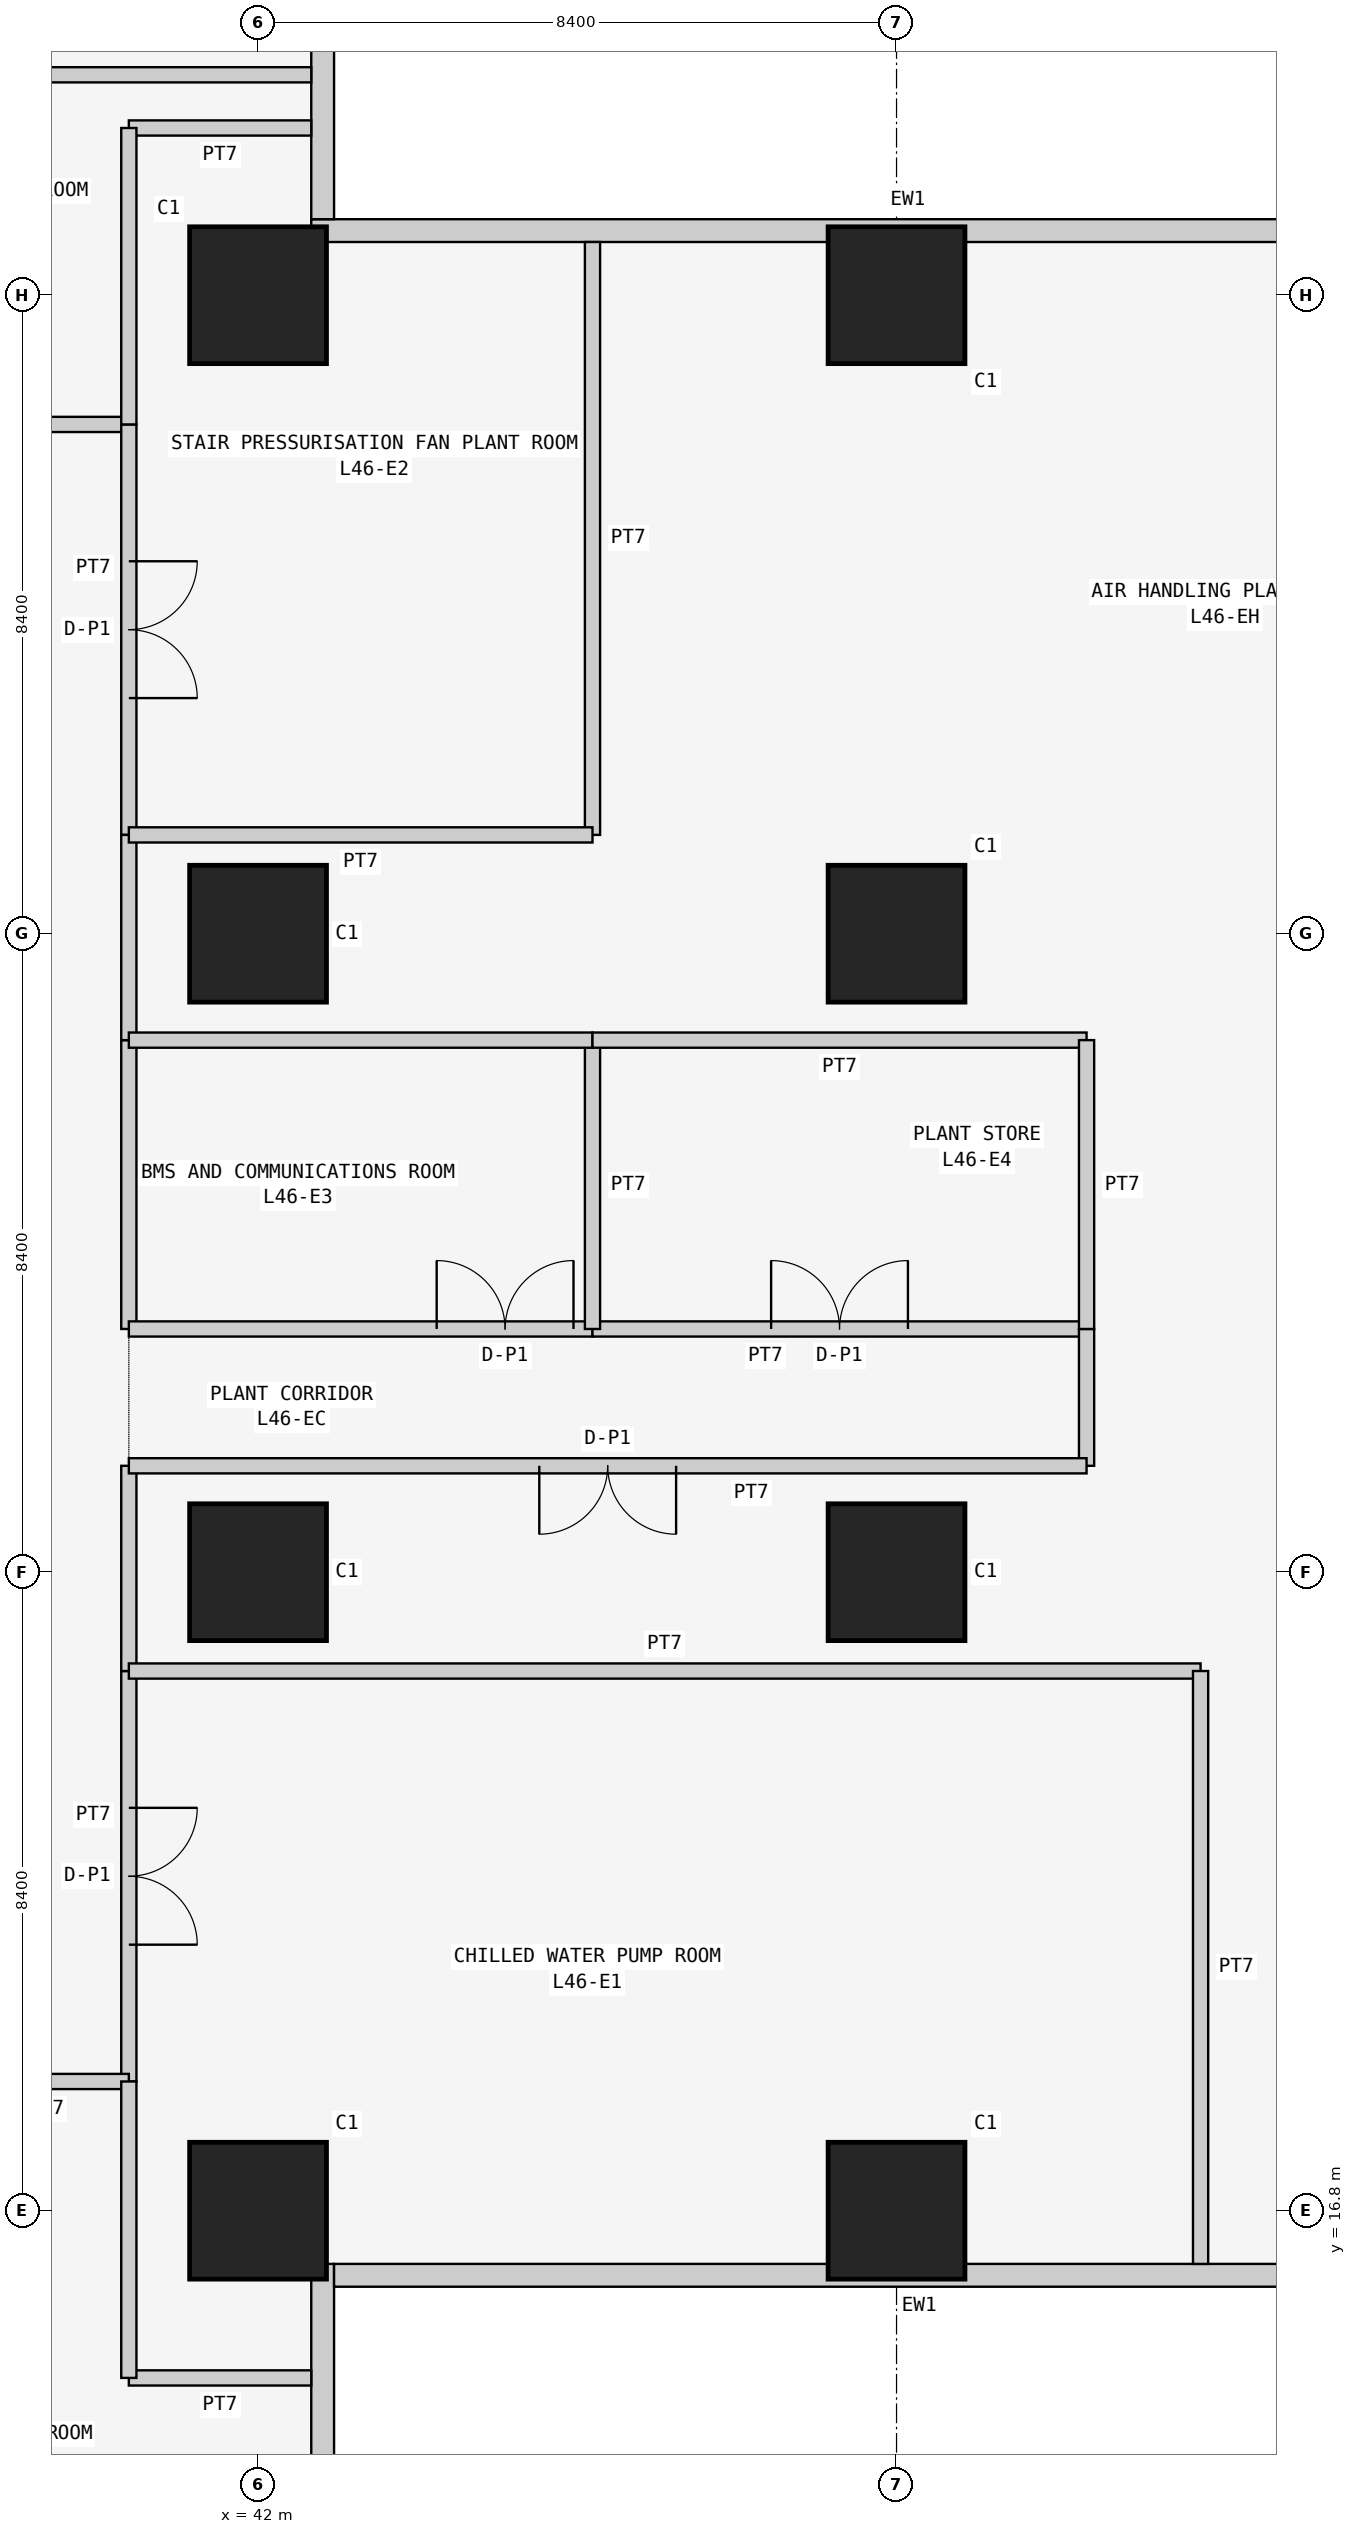
"""IFC4 building model, lengths in metres.
Left out: names, types, materials, properties, quantities, classifications, styles, units other than length and angle.
Written with IfcOpenShell. Run it as: python <this file> out.ifc"""

import sys

from ifc_helpers import new_model, si_unit, direction, frame, frame_2d, origin, origin_2d, place, context, subcontext, project, spatial, rectangle, extrude, element, fill, save


model = new_model("IFC4")
c1 = context("Model", 3, precision=1e-05, world=origin(), true_north=direction((0.0, 1.0)))
c2 = subcontext(c1, "Body", "Model", "MODEL_VIEW")
j1 = project(units=[si_unit("LENGTHUNIT", "METRE"), si_unit("PLANEANGLEUNIT", "RADIAN")], contexts=[c1])
p1 = place(None, origin())
s1 = spatial("IfcSite", under=j1, at=p1, CompositionType="ELEMENT")
p2 = place(p1, origin())
s2 = spatial("IfcBuilding", under=s1, at=p2, CompositionType="ELEMENT")
p3 = place(p2, frame((0.0, 0.0, 177.3)))
s3 = spatial("IfcBuildingStorey", under=s2, at=p3, CompositionType="ELEMENT", Elevation=177.3)
for number, where, z_axis, x_axis in (
    (1, (42.0, 16.8, 0.0), (0.0, 0.0, 1.0), (1.0, 0.0, 0.0)),
    (2, (42.0, 25.2, 0.0), (0.0, 0.0, 1.0), (1.0, 0.0, 0.0)),
    (3, (42.0, 33.6, 0.0), (0.0, 0.0, 1.0), (1.0, 0.0, 0.0)),
    (4, (42.0, 42.0, 0.0), (0.0, 0.0, 1.0), (1.0, 0.0, 0.0)),
    (5, (50.4, 16.8, 0.0), (0.0, 0.0, 1.0), (1.0, 0.0, 0.0)),
    (6, (50.4, 25.2, 0.0), (0.0, 0.0, 1.0), (1.0, 0.0, 0.0)),
    (7, (50.4, 33.6, 0.0), (0.0, 0.0, 1.0), (1.0, 0.0, 0.0)),
    (8, (50.4, 42.0, 0.0), (0.0, 0.0, 1.0), (1.0, 0.0, 0.0)),
):
    element("IfcColumn", number, at=place(p3, frame(where, z_axis=z_axis, x_axis=x_axis)), inside=s3, PredefinedType="COLUMN", context=c2, shape_type="SweptSolid", body=[
        extrude(rectangle(XDim=1.8, YDim=1.8, at=origin_2d()), origin(), (0.0, 0.0, 1.0), 6.0),
    ])
p4 = place(p3, frame((42.85, 8.8, 0.0), z_axis=(0.0, 0.0, 1.0), x_axis=(0.0, 1.0, 0.0)))
e9 = element("IfcWall", 9, at=p4, inside=s3, PredefinedType="SOLIDWALL", context=c2, shape_type="SweptSolid", body=[
    extrude(rectangle(XDim=7.3, YDim=0.3, at=frame_2d((3.65, 0.0))), origin(), (0.0, 0.0, 1.0), 5.85),
])
p5 = place(p3, frame((43.0, 15.95, 0.0), z_axis=(0.0, 0.0, 1.0), x_axis=(1.0, 0.0, 0.0)))
e10 = element("IfcWall", 10, at=p5, inside=s3, PredefinedType="SOLIDWALL", context=c2, shape_type="SweptSolid", body=[
    extrude(rectangle(XDim=15.4, YDim=0.3, at=frame_2d((7.7, 0.0))), origin(), (0.0, 0.0, 1.0), 5.85),
])
p6 = place(p3, frame((58.4, 42.85, 0.0), z_axis=(0.0, 0.0, 1.0), x_axis=(-1.0, 0.0, 0.0)))
e11 = element("IfcWall", 11, at=p6, inside=s3, PredefinedType="SOLIDWALL", context=c2, shape_type="SweptSolid", body=[
    extrude(rectangle(XDim=15.7, YDim=0.3, at=frame_2d((7.85, 0.0))), origin(), (0.0, 0.0, 1.0), 5.85),
])
p7 = place(p3, frame((42.85, 43.0, 0.0), z_axis=(0.0, 0.0, 1.0), x_axis=(0.0, 1.0, 0.0)))
e12 = element("IfcWall", 12, at=p7, inside=s3, PredefinedType="SOLIDWALL", context=c2, shape_type="SweptSolid", body=[
    extrude(rectangle(XDim=7.0, YDim=0.3, at=frame_2d((3.5, 0.0))), origin(), (0.0, 0.0, 1.0), 5.85),
])
p8 = place(p3, frame((34.9, 40.3, 0.0), z_axis=(0.0, 0.0, 1.0), x_axis=(1.0, 0.0, 0.0)))
e13 = element("IfcWall", 13, at=p8, inside=s3, PredefinedType="PARTITIONING", context=c2, shape_type="SweptSolid", body=[
    extrude(rectangle(XDim=5.4, YDim=0.2, at=frame_2d((2.7, 0.0))), origin(), (0.0, 0.0, 1.0), 5.85),
])
p9 = place(p8, frame((1.8, 0.0, 0.0)))
e14 = element("IfcOpeningElement", 14, at=p9, cuts=e13, PredefinedType="OPENING", context=c2, shape_type="SweptSolid", body=[
    extrude(rectangle(XDim=1.8, YDim=2.4, at=frame_2d((0.9, 1.2))), frame((0.0, 0.11, 0.0), z_axis=(0.0, -1.0, 0.0), x_axis=(1.0, 0.0, 0.0)), (0.0, 0.0, 1.0), 0.22),
])
p10 = place(p3, frame((40.3, 23.9, 0.0), z_axis=(0.0, 0.0, 1.0), x_axis=(0.0, -1.0, 0.0)))
e15 = element("IfcWall", 15, at=p10, inside=s3, PredefinedType="PARTITIONING", context=c2, shape_type="SweptSolid", body=[
    extrude(rectangle(XDim=5.4, YDim=0.2, at=frame_2d((2.7, 0.0))), origin(), (0.0, 0.0, 1.0), 5.85),
])
p11 = place(p10, frame((1.8, 0.0, 0.0)))
e16 = element("IfcOpeningElement", 16, at=p11, cuts=e15, PredefinedType="OPENING", context=c2, shape_type="SweptSolid", body=[
    extrude(rectangle(XDim=1.8, YDim=2.4, at=frame_2d((0.9, 1.2))), frame((0.0, 0.11, 0.0), z_axis=(0.0, -1.0, 0.0), x_axis=(1.0, 0.0, 0.0)), (0.0, 0.0, 1.0), 0.22),
])
p12 = place(p3, frame((40.3, 40.3, 0.0), z_axis=(0.0, 0.0, 1.0), x_axis=(0.0, -1.0, 0.0)))
e17 = element("IfcWall", 17, at=p12, inside=s3, PredefinedType="PARTITIONING", context=c2, shape_type="SweptSolid", body=[
    extrude(rectangle(XDim=5.4, YDim=0.2, at=frame_2d((2.7, 0.0))), origin(), (0.0, 0.0, 1.0), 5.85),
])
p13 = place(p12, frame((1.8, 0.0, 0.0)))
e18 = element("IfcOpeningElement", 18, at=p13, cuts=e17, PredefinedType="OPENING", context=c2, shape_type="SweptSolid", body=[
    extrude(rectangle(XDim=1.8, YDim=2.4, at=frame_2d((0.9, 1.2))), frame((0.0, 0.11, 0.0), z_axis=(0.0, -1.0, 0.0), x_axis=(1.0, 0.0, 0.0)), (0.0, 0.0, 1.0), 0.22),
])
p14 = place(p3, frame((40.3, 32.2, 0.0), z_axis=(0.0, 0.0, 1.0), x_axis=(0.0, -1.0, 0.0)))
e19 = element("IfcWall", 19, at=p14, inside=s3, PredefinedType="PARTITIONING", context=c2, shape_type="SweptSolid", body=[
    extrude(rectangle(XDim=3.8, YDim=0.2, at=frame_2d((1.9, 0.0))), origin(), (0.0, 0.0, 1.0), 5.85),
])
p15 = place(p3, frame((40.3, 26.6, 0.0), z_axis=(0.0, 0.0, 1.0), x_axis=(0.0, -1.0, 0.0)))
e20 = element("IfcWall", 20, at=p15, inside=s3, PredefinedType="PARTITIONING", context=c2, shape_type="SweptSolid", body=[
    extrude(rectangle(XDim=2.7, YDim=0.2, at=frame_2d((1.35, 0.0))), origin(), (0.0, 0.0, 1.0), 5.85),
])
p16 = place(p3, frame((40.3, 34.9, 0.0), z_axis=(0.0, 0.0, 1.0), x_axis=(0.0, -1.0, 0.0)))
e21 = element("IfcWall", 21, at=p16, inside=s3, PredefinedType="PARTITIONING", context=c2, shape_type="SweptSolid", body=[
    extrude(rectangle(XDim=2.7, YDim=0.2, at=frame_2d((1.35, 0.0))), origin(), (0.0, 0.0, 1.0), 5.85),
])
p17 = place(p3, frame((40.3, 18.5, 0.0), z_axis=(0.0, 0.0, 1.0), x_axis=(-1.0, 0.0, 0.0)))
e22 = element("IfcWall", 22, at=p17, inside=s3, PredefinedType="PARTITIONING", context=c2, shape_type="SweptSolid", body=[
    extrude(rectangle(XDim=5.4, YDim=0.2, at=frame_2d((2.7, 0.0))), origin(), (0.0, 0.0, 1.0), 5.85),
])
p18 = place(p17, frame((1.8, 0.0, 0.0)))
e23 = element("IfcOpeningElement", 23, at=p18, cuts=e22, PredefinedType="OPENING", context=c2, shape_type="SweptSolid", body=[
    extrude(rectangle(XDim=1.8, YDim=2.4, at=frame_2d((0.9, 1.2))), frame((0.0, 0.11, 0.0), z_axis=(0.0, -1.0, 0.0), x_axis=(1.0, 0.0, 0.0)), (0.0, 0.0, 1.0), 0.22),
])
p19 = place(p3, frame((34.9, 44.9, 0.0), z_axis=(0.0, 0.0, 1.0), x_axis=(1.0, 0.0, 0.0)))
e24 = element("IfcWall", 24, at=p19, inside=s3, PredefinedType="PARTITIONING", context=c2, shape_type="SweptSolid", body=[
    extrude(rectangle(XDim=7.8, YDim=0.2, at=frame_2d((3.9, 0.0))), origin(), (0.0, 0.0, 1.0), 5.85),
])
p20 = place(p3, frame((42.7, 44.2, 0.0), z_axis=(0.0, 0.0, 1.0), x_axis=(-1.0, 0.0, 0.0)))
e25 = element("IfcWall", 25, at=p20, inside=s3, PredefinedType="PARTITIONING", context=c2, shape_type="SweptSolid", body=[
    extrude(rectangle(XDim=2.4, YDim=0.2, at=frame_2d((1.2, 0.0))), origin(), (0.0, 0.0, 1.0), 5.85),
])
p21 = place(p3, frame((40.3, 44.2, 0.0), z_axis=(0.0, 0.0, 1.0), x_axis=(0.0, -1.0, 0.0)))
e26 = element("IfcWall", 26, at=p21, inside=s3, PredefinedType="PARTITIONING", context=c2, shape_type="SweptSolid", body=[
    extrude(rectangle(XDim=3.9, YDim=0.2, at=frame_2d((1.95, 0.0))), origin(), (0.0, 0.0, 1.0), 5.85),
])
p22 = place(p3, frame((40.3, 23.9, 0.0), z_axis=(0.0, 0.0, 1.0), x_axis=(1.0, 0.0, 0.0)))
e27 = element("IfcWall", 27, at=p22, inside=s3, PredefinedType="PARTITIONING", context=c2, shape_type="SweptSolid", body=[
    extrude(rectangle(XDim=14.1, YDim=0.2, at=frame_2d((7.05, 0.0))), origin(), (0.0, 0.0, 1.0), 5.75),
])
p23 = place(p3, frame((54.4, 23.9, 0.0), z_axis=(0.0, 0.0, 1.0), x_axis=(0.0, -1.0, 0.0)))
e28 = element("IfcWall", 28, at=p23, inside=s3, PredefinedType="PARTITIONING", context=c2, shape_type="SweptSolid", body=[
    extrude(rectangle(XDim=7.8, YDim=0.2, at=frame_2d((3.9, 0.0))), origin(), (0.0, 0.0, 1.0), 5.75),
])
p24 = place(p3, frame((42.7, 14.6, 0.0), z_axis=(0.0, 0.0, 1.0), x_axis=(-1.0, 0.0, 0.0)))
e29 = element("IfcWall", 29, at=p24, inside=s3, PredefinedType="PARTITIONING", context=c2, shape_type="SweptSolid", body=[
    extrude(rectangle(XDim=2.4, YDim=0.2, at=frame_2d((1.2, 0.0))), origin(), (0.0, 0.0, 1.0), 5.85),
])
p25 = place(p3, frame((40.3, 14.6, 0.0), z_axis=(0.0, 0.0, 1.0), x_axis=(0.0, 1.0, 0.0)))
e30 = element("IfcWall", 30, at=p25, inside=s3, PredefinedType="PARTITIONING", context=c2, shape_type="SweptSolid", body=[
    extrude(rectangle(XDim=3.9, YDim=0.2, at=frame_2d((1.95, 0.0))), origin(), (0.0, 0.0, 1.0), 5.85),
])
p26 = place(p3, frame((46.4, 42.7, 0.0), z_axis=(0.0, 0.0, 1.0), x_axis=(0.0, -1.0, 0.0)))
e31 = element("IfcWall", 31, at=p26, inside=s3, PredefinedType="PARTITIONING", context=c2, shape_type="SweptSolid", body=[
    extrude(rectangle(XDim=7.8, YDim=0.2, at=frame_2d((3.9, 0.0))), origin(), (0.0, 0.0, 1.0), 5.85),
])
p27 = place(p3, frame((46.4, 34.9, 0.0), z_axis=(0.0, 0.0, 1.0), x_axis=(-1.0, 0.0, 0.0)))
e32 = element("IfcWall", 32, at=p27, inside=s3, PredefinedType="PARTITIONING", context=c2, shape_type="SweptSolid", body=[
    extrude(rectangle(XDim=6.1, YDim=0.2, at=frame_2d((3.05, 0.0))), origin(), (0.0, 0.0, 1.0), 5.85),
])
p28 = place(p3, frame((40.3, 28.4, 0.0), z_axis=(0.0, 0.0, 1.0), x_axis=(1.0, 0.0, 0.0)))
e33 = element("IfcWall", 33, at=p28, inside=s3, PredefinedType="PARTITIONING", context=c2, shape_type="SweptSolid", body=[
    extrude(rectangle(XDim=6.1, YDim=0.2, at=frame_2d((3.05, 0.0))), origin(), (0.0, 0.0, 1.0), 5.85),
])
p29 = place(p28, frame((4.05, 0.0, 0.0)))
e34 = element("IfcOpeningElement", 34, at=p29, cuts=e33, PredefinedType="OPENING", context=c2, shape_type="SweptSolid", body=[
    extrude(rectangle(XDim=1.8, YDim=2.4, at=frame_2d((0.9, 1.2))), frame((0.0, 0.11, 0.0), z_axis=(0.0, -1.0, 0.0), x_axis=(1.0, 0.0, 0.0)), (0.0, 0.0, 1.0), 0.22),
])
p30 = place(p3, frame((46.4, 28.4, 0.0), z_axis=(0.0, 0.0, 1.0), x_axis=(1.0, 0.0, 0.0)))
e35 = element("IfcWall", 35, at=p30, inside=s3, PredefinedType="PARTITIONING", context=c2, shape_type="SweptSolid", body=[
    extrude(rectangle(XDim=6.5, YDim=0.2, at=frame_2d((3.25, 0.0))), origin(), (0.0, 0.0, 1.0), 5.75),
])
p31 = place(p30, frame((2.35, 0.0, 0.0)))
e36 = element("IfcOpeningElement", 36, at=p31, cuts=e35, PredefinedType="OPENING", context=c2, shape_type="SweptSolid", body=[
    extrude(rectangle(XDim=1.8, YDim=2.4, at=frame_2d((0.9, 1.2))), frame((0.0, 0.11, 0.0), z_axis=(0.0, -1.0, 0.0), x_axis=(1.0, 0.0, 0.0)), (0.0, 0.0, 1.0), 0.22),
])
p32 = place(p3, frame((52.9, 28.4, 0.0), z_axis=(0.0, 0.0, 1.0), x_axis=(0.0, -1.0, 0.0)))
e37 = element("IfcWall", 37, at=p32, inside=s3, PredefinedType="PARTITIONING", context=c2, shape_type="SweptSolid", body=[
    extrude(rectangle(XDim=1.8, YDim=0.2, at=frame_2d((0.9, 0.0))), origin(), (0.0, 0.0, 1.0), 5.75),
])
p33 = place(p3, frame((52.9, 26.6, 0.0), z_axis=(0.0, 0.0, 1.0), x_axis=(-1.0, 0.0, 0.0)))
e38 = element("IfcWall", 38, at=p33, inside=s3, PredefinedType="PARTITIONING", context=c2, shape_type="SweptSolid", body=[
    extrude(rectangle(XDim=12.6, YDim=0.2, at=frame_2d((6.3, 0.0))), origin(), (0.0, 0.0, 1.0), 5.75),
])
p34 = place(p33, frame((5.4, 0.0, 0.0)))
e39 = element("IfcOpeningElement", 39, at=p34, cuts=e38, PredefinedType="OPENING", context=c2, shape_type="SweptSolid", body=[
    extrude(rectangle(XDim=1.8, YDim=2.4, at=frame_2d((0.9, 1.2))), frame((0.0, 0.11, 0.0), z_axis=(0.0, -1.0, 0.0), x_axis=(1.0, 0.0, 0.0)), (0.0, 0.0, 1.0), 0.22),
])
p35 = place(p3, frame((46.4, 32.2, 0.0), z_axis=(0.0, 0.0, 1.0), x_axis=(0.0, -1.0, 0.0)))
e40 = element("IfcWall", 40, at=p35, inside=s3, PredefinedType="PARTITIONING", context=c2, shape_type="SweptSolid", body=[
    extrude(rectangle(XDim=3.8, YDim=0.2, at=frame_2d((1.9, 0.0))), origin(), (0.0, 0.0, 1.0), 5.85),
])
p36 = place(p3, frame((40.3, 32.2, 0.0), z_axis=(0.0, 0.0, 1.0), x_axis=(1.0, 0.0, 0.0)))
e41 = element("IfcWall", 41, at=p36, inside=s3, PredefinedType="PARTITIONING", context=c2, shape_type="SweptSolid", body=[
    extrude(rectangle(XDim=6.1, YDim=0.2, at=frame_2d((3.05, 0.0))), origin(), (0.0, 0.0, 1.0), 5.85),
])
p37 = place(p3, frame((46.4, 32.2, 0.0), z_axis=(0.0, 0.0, 1.0), x_axis=(1.0, 0.0, 0.0)))
e42 = element("IfcWall", 42, at=p37, inside=s3, PredefinedType="PARTITIONING", context=c2, shape_type="SweptSolid", body=[
    extrude(rectangle(XDim=6.5, YDim=0.2, at=frame_2d((3.25, 0.0))), origin(), (0.0, 0.0, 1.0), 5.75),
])
p38 = place(p3, frame((52.9, 32.2, 0.0), z_axis=(0.0, 0.0, 1.0), x_axis=(0.0, -1.0, 0.0)))
e43 = element("IfcWall", 43, at=p38, inside=s3, PredefinedType="PARTITIONING", context=c2, shape_type="SweptSolid", body=[
    extrude(rectangle(XDim=3.8, YDim=0.2, at=frame_2d((1.9, 0.0))), origin(), (0.0, 0.0, 1.0), 5.75),
])
p39 = place(p11, origin())
e44 = element("IfcDoor", 44, at=p39, inside=s3, OperationType="DOUBLE_DOOR_SINGLE_SWING", PredefinedType="DOOR", context=c2, shape_type="SweptSolid", body=[
    extrude(rectangle(XDim=1.8, YDim=2.4, at=frame_2d((0.9, 1.2))), frame((0.0, 0.025, 0.0), z_axis=(0.0, -1.0, 0.0), x_axis=(1.0, 0.0, 0.0)), (0.0, 0.0, 1.0), 0.05),
])
fill(e16, e44)
p40 = place(p13, origin())
e45 = element("IfcDoor", 45, at=p40, inside=s3, OperationType="DOUBLE_DOOR_SINGLE_SWING", PredefinedType="DOOR", context=c2, shape_type="SweptSolid", body=[
    extrude(rectangle(XDim=1.8, YDim=2.4, at=frame_2d((0.9, 1.2))), frame((0.0, 0.025, 0.0), z_axis=(0.0, -1.0, 0.0), x_axis=(1.0, 0.0, 0.0)), (0.0, 0.0, 1.0), 0.05),
])
fill(e18, e45)
p41 = place(p29, origin())
e46 = element("IfcDoor", 46, at=p41, inside=s3, OperationType="DOUBLE_DOOR_SINGLE_SWING", PredefinedType="DOOR", context=c2, shape_type="SweptSolid", body=[
    extrude(rectangle(XDim=1.8, YDim=2.4, at=frame_2d((0.9, 1.2))), frame((0.0, 0.025, 0.0), z_axis=(0.0, -1.0, 0.0), x_axis=(1.0, 0.0, 0.0)), (0.0, 0.0, 1.0), 0.05),
])
fill(e34, e46)
p42 = place(p31, origin())
e47 = element("IfcDoor", 47, at=p42, inside=s3, OperationType="DOUBLE_DOOR_SINGLE_SWING", PredefinedType="DOOR", context=c2, shape_type="SweptSolid", body=[
    extrude(rectangle(XDim=1.8, YDim=2.4, at=frame_2d((0.9, 1.2))), frame((0.0, 0.025, 0.0), z_axis=(0.0, -1.0, 0.0), x_axis=(1.0, 0.0, 0.0)), (0.0, 0.0, 1.0), 0.05),
])
fill(e36, e47)
p43 = place(p34, origin())
e48 = element("IfcDoor", 48, at=p43, inside=s3, OperationType="DOUBLE_DOOR_SINGLE_SWING", PredefinedType="DOOR", context=c2, shape_type="SweptSolid", body=[
    extrude(rectangle(XDim=1.8, YDim=2.4, at=frame_2d((0.9, 1.2))), frame((0.0, 0.025, 0.0), z_axis=(0.0, -1.0, 0.0), x_axis=(1.0, 0.0, 0.0)), (0.0, 0.0, 1.0), 0.05),
])
fill(e39, e48)
save(model, sys.argv[1])
